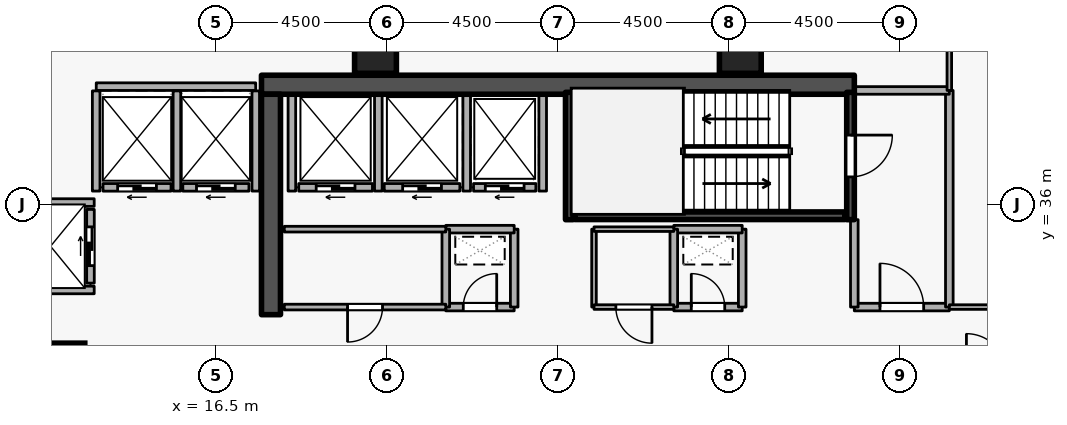
"""IFC4 building model, lengths in metres.
Left out: names, types, materials, properties, quantities, classifications, styles, units other than length and angle.
Written with IfcOpenShell. Run it as: python <this file> out.ifc"""

import sys

from ifc_helpers import new_model, si_unit, direction, frame, frame_2d, origin, origin_2d, place, context, subcontext, project, spatial, rectangle, extrude, element, fill, save


model = new_model("IFC4")
c1 = context("Model", 3, precision=1e-05, world=origin(), true_north=direction((0.0, 1.0)))
c2 = subcontext(c1, "Body", "Model", "MODEL_VIEW")
j1 = project(units=[si_unit("LENGTHUNIT", "METRE"), si_unit("PLANEANGLEUNIT", "RADIAN")], contexts=[c1])
p1 = place(None, origin())
s1 = spatial("IfcSite", under=j1, at=p1, CompositionType="ELEMENT")
p2 = place(p1, origin())
s2 = spatial("IfcBuilding", under=s1, at=p2, CompositionType="ELEMENT")
p3 = place(p2, frame((0.0, 0.0, 192.9)))
s3 = spatial("IfcBuildingStorey", under=s2, at=p3, CompositionType="ELEMENT", Elevation=192.9)
p4 = place(p3, frame((17.7, 39.15, 0.0), z_axis=(0.0, 0.0, 1.0), x_axis=(1.0, 0.0, 0.0)))
e1 = element("IfcWall", 1, at=p4, inside=s3, PredefinedType="SHEAR", context=c2, shape_type="SweptSolid", body=[
    extrude(rectangle(XDim=15.6, YDim=0.5, at=frame_2d((7.8, 0.0))), origin(), (0.0, 0.0, 1.0), 3.6),
])
p5 = place(p3, frame((17.95, 33.1, 0.0), z_axis=(0.0, 0.0, 1.0), x_axis=(0.0, 1.0, 0.0)))
e2 = element("IfcWall", 2, at=p5, inside=s3, PredefinedType="SHEAR", context=c2, shape_type="SweptSolid", body=[
    extrude(rectangle(XDim=5.8, YDim=0.5, at=frame_2d((2.9, 0.0))), origin(), (0.0, 0.0, 1.0), 3.6),
])
for number, where, z_axis, x_axis in (
    (3, (12.5, 31.8, 0.0), (0.0, 0.0, 1.0), (1.0, 0.0, 0.0)),
    (4, (20.7, 40.0, 0.0), (0.0, 0.0, 1.0), (1.0, 0.0, 0.0)),
    (5, (30.3, 40.0, 0.0), (0.0, 0.0, 1.0), (1.0, 0.0, 0.0)),
):
    element("IfcColumn", number, at=place(p3, frame(where, z_axis=z_axis, x_axis=x_axis)), inside=s3, PredefinedType="COLUMN", context=c2, shape_type="SweptSolid", body=[
        extrude(rectangle(XDim=1.1, YDim=1.1, at=origin_2d()), origin(), (0.0, 0.0, 1.0), 3.6),
    ])
p6 = place(p3, frame((24.92, 36.45, 0.0), z_axis=(0.0, 0.0, 1.0), x_axis=(-1.0, 0.0, 0.0)))
e6 = element("IfcWall", 6, at=p6, inside=s3, PredefinedType="STANDARD", context=c2, shape_type="SweptSolid", body=[
    extrude(rectangle(XDim=1.64, YDim=0.2, at=frame_2d((0.82, 0.0))), origin(), (0.0, 0.0, 1.0), 3.34),
])
p7 = place(p6, frame((0.31, 0.0, 0.0)))
e7 = element("IfcOpeningElement", 7, at=p7, cuts=e6, PredefinedType="OPENING", context=c2, shape_type="SweptSolid", body=[
    extrude(rectangle(XDim=1.02, YDim=2.06, at=frame_2d((0.51, 1.03))), frame((0.0, 0.11, 0.0), z_axis=(0.0, -1.0, 0.0), x_axis=(1.0, 0.0, 0.0)), (0.0, 0.0, 1.0), 0.22),
])
p8 = place(p3, frame((22.92, 36.45, 0.0), z_axis=(0.0, 0.0, 1.0), x_axis=(-1.0, 0.0, 0.0)))
e8 = element("IfcWall", 8, at=p8, inside=s3, PredefinedType="STANDARD", context=c2, shape_type="SweptSolid", body=[
    extrude(rectangle(XDim=1.99, YDim=0.2, at=frame_2d((0.995, 0.0))), origin(), (0.0, 0.0, 1.0), 3.34),
])
p9 = place(p8, frame((0.485, 0.0, 0.0)))
e9 = element("IfcOpeningElement", 9, at=p9, cuts=e8, PredefinedType="OPENING", context=c2, shape_type="SweptSolid", body=[
    extrude(rectangle(XDim=1.02, YDim=2.06, at=frame_2d((0.51, 1.03))), frame((0.0, 0.11, 0.0), z_axis=(0.0, -1.0, 0.0), x_axis=(1.0, 0.0, 0.0)), (0.0, 0.0, 1.0), 0.22),
])
p10 = place(p3, frame((20.62, 36.45, 0.0), z_axis=(0.0, 0.0, 1.0), x_axis=(-1.0, 0.0, 0.0)))
e10 = element("IfcWall", 10, at=p10, inside=s3, PredefinedType="STANDARD", context=c2, shape_type="SweptSolid", body=[
    extrude(rectangle(XDim=1.94, YDim=0.2, at=frame_2d((0.97, 0.0))), origin(), (0.0, 0.0, 1.0), 3.34),
])
p11 = place(p10, frame((0.46, 0.0, 0.0)))
e11 = element("IfcOpeningElement", 11, at=p11, cuts=e10, PredefinedType="OPENING", context=c2, shape_type="SweptSolid", body=[
    extrude(rectangle(XDim=1.02, YDim=2.06, at=frame_2d((0.51, 1.03))), frame((0.0, 0.11, 0.0), z_axis=(0.0, -1.0, 0.0), x_axis=(1.0, 0.0, 0.0)), (0.0, 0.0, 1.0), 0.22),
])
p12 = place(p3, frame((17.37, 36.45, 0.0), z_axis=(0.0, 0.0, 1.0), x_axis=(-1.0, 0.0, 0.0)))
e12 = element("IfcWall", 12, at=p12, inside=s3, PredefinedType="STANDARD", context=c2, shape_type="SweptSolid", body=[
    extrude(rectangle(XDim=1.74, YDim=0.2, at=frame_2d((0.87, 0.0))), origin(), (0.0, 0.0, 1.0), 3.34),
])
p13 = place(p12, frame((0.36, 0.0, 0.0)))
e13 = element("IfcOpeningElement", 13, at=p13, cuts=e12, PredefinedType="OPENING", context=c2, shape_type="SweptSolid", body=[
    extrude(rectangle(XDim=1.02, YDim=2.06, at=frame_2d((0.51, 1.03))), frame((0.0, 0.11, 0.0), z_axis=(0.0, -1.0, 0.0), x_axis=(1.0, 0.0, 0.0)), (0.0, 0.0, 1.0), 0.22),
])
p14 = place(p3, frame((15.32, 36.45, 0.0), z_axis=(0.0, 0.0, 1.0), x_axis=(-1.0, 0.0, 0.0)))
e14 = element("IfcWall", 14, at=p14, inside=s3, PredefinedType="STANDARD", context=c2, shape_type="SweptSolid", body=[
    extrude(rectangle(XDim=1.79, YDim=0.2, at=frame_2d((0.895, 0.0))), origin(), (0.0, 0.0, 1.0), 3.34),
])
p15 = place(p14, frame((0.385, 0.0, 0.0)))
e15 = element("IfcOpeningElement", 15, at=p15, cuts=e14, PredefinedType="OPENING", context=c2, shape_type="SweptSolid", body=[
    extrude(rectangle(XDim=1.02, YDim=2.06, at=frame_2d((0.51, 1.03))), frame((0.0, 0.11, 0.0), z_axis=(0.0, -1.0, 0.0), x_axis=(1.0, 0.0, 0.0)), (0.0, 0.0, 1.0), 0.22),
])
p16 = place(p3, frame((13.2, 33.93, 0.0), z_axis=(0.0, 0.0, 1.0), x_axis=(0.0, 1.0, 0.0)))
e16 = element("IfcWall", 16, at=p16, inside=s3, PredefinedType="STANDARD", context=c2, shape_type="SweptSolid", body=[
    extrude(rectangle(XDim=1.94, YDim=0.2, at=frame_2d((0.97, 0.0))), origin(), (0.0, 0.0, 1.0), 3.34),
])
p17 = place(p16, frame((0.46, 0.0, 0.0)))
e17 = element("IfcOpeningElement", 17, at=p17, cuts=e16, PredefinedType="OPENING", context=c2, shape_type="SweptSolid", body=[
    extrude(rectangle(XDim=1.02, YDim=2.06, at=frame_2d((0.51, 1.03))), frame((0.0, 0.11, 0.0), z_axis=(0.0, -1.0, 0.0), x_axis=(1.0, 0.0, 0.0)), (0.0, 0.0, 1.0), 0.22),
])
for number, where, z_axis, x_axis in (
    (18, (25.1, 36.352, 0.0), (0.0, 0.0, 1.0), (0.0, 1.0, 0.0)),
    (19, (23.1, 36.352, 0.0), (0.0, 0.0, 1.0), (0.0, 1.0, 0.0)),
    (20, (20.775, 36.352, 0.0), (0.0, 0.0, 1.0), (0.0, 1.0, 0.0)),
    (21, (18.5, 36.352, 0.0), (0.0, 0.0, 1.0), (0.0, 1.0, 0.0)),
):
    element("IfcWall", number, at=place(p3, frame(where, z_axis=z_axis, x_axis=x_axis)), inside=s3, PredefinedType="STANDARD", context=c2, shape_type="SweptSolid", body=[
        extrude(rectangle(XDim=2.536, YDim=0.2, at=frame_2d((1.268, 0.0))), origin(), (0.0, 0.0, 1.0), 3.34),
    ])
p18 = place(p3, frame((13.352, 39.1, 0.0), z_axis=(0.0, 0.0, 1.0), x_axis=(1.0, 0.0, 0.0)))
e22 = element("IfcWall", 22, at=p18, inside=s3, PredefinedType="STANDARD", context=c2, shape_type="SweptSolid", body=[
    extrude(rectangle(XDim=4.196, YDim=0.2, at=frame_2d((2.098, 0.0))), origin(), (0.0, 0.0, 1.0), 3.34),
])
p19 = place(p3, frame((17.55, 36.352, 0.0), z_axis=(0.0, 0.0, 1.0), x_axis=(0.0, 1.0, 0.0)))
e23 = element("IfcWall", 23, at=p19, inside=s3, PredefinedType="STANDARD", context=c2, shape_type="SweptSolid", body=[
    extrude(rectangle(XDim=2.636, YDim=0.2, at=frame_2d((1.318, 0.0))), origin(), (0.0, 0.0, 1.0), 2.545),
])
for number, where, z_axis, x_axis in (
    (24, (15.475, 36.352, 0.0), (0.0, 0.0, 1.0), (0.0, 1.0, 0.0)),
    (25, (13.35, 36.352, 0.0), (0.0, 0.0, 1.0), (0.0, 1.0, 0.0)),
):
    element("IfcWall", number, at=place(p3, frame(where, z_axis=z_axis, x_axis=x_axis)), inside=s3, PredefinedType="STANDARD", context=c2, shape_type="SweptSolid", body=[
        extrude(rectangle(XDim=2.636, YDim=0.2, at=frame_2d((1.318, 0.0))), origin(), (0.0, 0.0, 1.0), 3.34),
    ])
for number, where, z_axis, x_axis in (
    (26, (11.002, 36.05, 0.0), (0.0, 0.0, 1.0), (1.0, 0.0, 0.0)),
    (27, (11.002, 33.75, 0.0), (0.0, 0.0, 1.0), (1.0, 0.0, 0.0)),
):
    element("IfcWall", number, at=place(p3, frame(where, z_axis=z_axis, x_axis=x_axis)), inside=s3, PredefinedType="STANDARD", context=c2, shape_type="SweptSolid", body=[
        extrude(rectangle(XDim=2.296, YDim=0.2, at=frame_2d((1.148, 0.0))), origin(), (0.0, 0.0, 1.0), 3.34),
    ])
p20 = place(p3, frame((33.2, 38.95, 0.0), z_axis=(0.0, 0.0, 1.0), x_axis=(0.0, -1.0, 0.0)))
e28 = element("IfcWall", 28, at=p20, inside=s3, PredefinedType="SHEAR", context=c2, shape_type="SweptSolid", body=[
    extrude(rectangle(XDim=3.35, YDim=0.2, at=frame_2d((1.675, 0.0))), origin(), (0.0, 0.0, 1.0), 3.6),
])
p21 = place(p20, frame((1.125, 0.0, 0.0)))
e29 = element("IfcOpeningElement", 29, at=p21, cuts=e28, PredefinedType="OPENING", context=c2, shape_type="SweptSolid", body=[
    extrude(rectangle(XDim=1.1, YDim=2.1, at=frame_2d((0.55, 1.05))), frame((0.0, 0.11, 0.0), z_axis=(0.0, -1.0, 0.0), x_axis=(1.0, 0.0, 0.0)), (0.0, 0.0, 1.0), 0.22),
])
p22 = place(p3, frame((25.8, 35.6, 0.0), z_axis=(0.0, 0.0, 1.0), x_axis=(0.0, 1.0, 0.0)))
e30 = element("IfcWall", 30, at=p22, inside=s3, PredefinedType="SHEAR", context=c2, shape_type="SweptSolid", body=[
    extrude(rectangle(XDim=3.35, YDim=0.2, at=frame_2d((1.675, 0.0))), origin(), (0.0, 0.0, 1.0), 3.6),
])
p23 = place(p3, frame((25.95, 35.703, 0.0), z_axis=(0.0, 0.0, 1.0), x_axis=(1.0, 0.0, 0.0)))
e31 = element("IfcWall", 31, at=p23, inside=s3, PredefinedType="SHEAR", context=c2, shape_type="SweptSolid", body=[
    extrude(rectangle(XDim=7.1, YDim=0.2, at=frame_2d((3.55, 0.0))), origin(), (0.0, 0.0, 1.0), 3.6),
])
p24 = place(p3, frame((33.3, 33.3, 0.0), z_axis=(0.0, 0.0, 1.0), x_axis=(1.0, 0.0, 0.0)))
e32 = element("IfcWall", 32, at=p24, inside=s3, PredefinedType="STANDARD", context=c2, shape_type="SweptSolid", body=[
    extrude(rectangle(XDim=2.5, YDim=0.2, at=frame_2d((1.25, 0.0))), origin(), (0.0, 0.0, 1.0), 3.34),
])
p25 = place(p24, frame((0.675, 0.0, 0.0)))
e33 = element("IfcOpeningElement", 33, at=p25, cuts=e32, PredefinedType="OPENING", context=c2, shape_type="SweptSolid", body=[
    extrude(rectangle(XDim=1.15, YDim=2.1, at=frame_2d((0.575, 1.05))), frame((0.0, 0.11, 0.0), z_axis=(0.0, -1.0, 0.0), x_axis=(1.0, 0.0, 0.0)), (0.0, 0.0, 1.0), 0.22),
])
p26 = place(p3, frame((35.8, 33.3, 0.0), z_axis=(0.0, 0.0, 1.0), x_axis=(0.0, 1.0, 0.0)))
e34 = element("IfcWall", 34, at=p26, inside=s3, PredefinedType="STANDARD", context=c2, shape_type="SweptSolid", body=[
    extrude(rectangle(XDim=5.7, YDim=0.2, at=frame_2d((2.85, 0.0))), origin(), (0.0, 0.0, 1.0), 3.34),
])
p27 = place(p3, frame((35.8, 39.0, 0.0), z_axis=(0.0, 0.0, 1.0), x_axis=(-1.0, 0.0, 0.0)))
e35 = element("IfcWall", 35, at=p27, inside=s3, PredefinedType="STANDARD", context=c2, shape_type="SweptSolid", body=[
    extrude(rectangle(XDim=2.5, YDim=0.2, at=frame_2d((1.25, 0.0))), origin(), (0.0, 0.0, 1.0), 3.34),
])
p28 = place(p3, frame((33.3, 35.6, 0.0), z_axis=(0.0, 0.0, 1.0), x_axis=(0.0, -1.0, 0.0)))
e36 = element("IfcWall", 36, at=p28, inside=s3, PredefinedType="STANDARD", context=c2, shape_type="SweptSolid", body=[
    extrude(rectangle(XDim=2.3, YDim=0.2, at=frame_2d((1.15, 0.0))), origin(), (0.0, 0.0, 1.0), 2.545),
])
p29 = place(p3, frame((22.55, 33.3, 0.0), z_axis=(0.0, 0.0, 1.0), x_axis=(1.0, 0.0, 0.0)))
e37 = element("IfcWall", 37, at=p29, inside=s3, PredefinedType="STANDARD", context=c2, shape_type="SweptSolid", body=[
    extrude(rectangle(XDim=1.8, YDim=0.2, at=frame_2d((0.9, 0.0))), origin(), (0.0, 0.0, 1.0), 3.34),
])
p30 = place(p29, frame((0.46, 0.0, 0.0)))
e38 = element("IfcOpeningElement", 38, at=p30, cuts=e37, PredefinedType="OPENING", context=c2, shape_type="SweptSolid", body=[
    extrude(rectangle(XDim=0.88, YDim=2.04, at=frame_2d((0.44, 1.02))), frame((0.0, 0.11, 0.0), z_axis=(0.0, -1.0, 0.0), x_axis=(1.0, 0.0, 0.0)), (0.0, 0.0, 1.0), 0.22),
])
p31 = place(p3, frame((24.35, 33.3, 0.0), z_axis=(0.0, 0.0, 1.0), x_axis=(0.0, 1.0, 0.0)))
e39 = element("IfcWall", 39, at=p31, inside=s3, PredefinedType="STANDARD", context=c2, shape_type="SweptSolid", body=[
    extrude(rectangle(XDim=2.05, YDim=0.2, at=frame_2d((1.025, 0.0))), origin(), (0.0, 0.0, 1.0), 3.34),
])
p32 = place(p3, frame((24.35, 35.35, 0.0), z_axis=(0.0, 0.0, 1.0), x_axis=(-1.0, 0.0, 0.0)))
e40 = element("IfcWall", 40, at=p32, inside=s3, PredefinedType="STANDARD", context=c2, shape_type="SweptSolid", body=[
    extrude(rectangle(XDim=1.8, YDim=0.2, at=frame_2d((0.9, 0.0))), origin(), (0.0, 0.0, 1.0), 3.34),
])
p33 = place(p3, frame((22.55, 35.35, 0.0), z_axis=(0.0, 0.0, 1.0), x_axis=(0.0, -1.0, 0.0)))
e41 = element("IfcWall", 41, at=p33, inside=s3, PredefinedType="STANDARD", context=c2, shape_type="SweptSolid", body=[
    extrude(rectangle(XDim=2.05, YDim=0.2, at=frame_2d((1.025, 0.0))), origin(), (0.0, 0.0, 1.0), 3.34),
])
p34 = place(p3, frame((28.55, 33.3, 0.0), z_axis=(0.0, 0.0, 1.0), x_axis=(1.0, 0.0, 0.0)))
e42 = element("IfcWall", 42, at=p34, inside=s3, PredefinedType="STANDARD", context=c2, shape_type="SweptSolid", body=[
    extrude(rectangle(XDim=1.8, YDim=0.2, at=frame_2d((0.9, 0.0))), origin(), (0.0, 0.0, 1.0), 3.34),
])
p35 = place(p34, frame((0.46, 0.0, 0.0)))
e43 = element("IfcOpeningElement", 43, at=p35, cuts=e42, PredefinedType="OPENING", context=c2, shape_type="SweptSolid", body=[
    extrude(rectangle(XDim=0.88, YDim=2.04, at=frame_2d((0.44, 1.02))), frame((0.0, 0.11, 0.0), z_axis=(0.0, -1.0, 0.0), x_axis=(1.0, 0.0, 0.0)), (0.0, 0.0, 1.0), 0.22),
])
p36 = place(p3, frame((30.35, 33.3, 0.0), z_axis=(0.0, 0.0, 1.0), x_axis=(0.0, 1.0, 0.0)))
e44 = element("IfcWall", 44, at=p36, inside=s3, PredefinedType="STANDARD", context=c2, shape_type="SweptSolid", body=[
    extrude(rectangle(XDim=2.05, YDim=0.2, at=frame_2d((1.025, 0.0))), origin(), (0.0, 0.0, 1.0), 3.34),
])
p37 = place(p3, frame((30.35, 35.35, 0.0), z_axis=(0.0, 0.0, 1.0), x_axis=(-1.0, 0.0, 0.0)))
e45 = element("IfcWall", 45, at=p37, inside=s3, PredefinedType="STANDARD", context=c2, shape_type="SweptSolid", body=[
    extrude(rectangle(XDim=1.8, YDim=0.2, at=frame_2d((0.9, 0.0))), origin(), (0.0, 0.0, 1.0), 3.34),
])
p38 = place(p3, frame((28.55, 35.35, 0.0), z_axis=(0.0, 0.0, 1.0), x_axis=(0.0, -1.0, 0.0)))
e46 = element("IfcWall", 46, at=p38, inside=s3, PredefinedType="STANDARD", context=c2, shape_type="SweptSolid", body=[
    extrude(rectangle(XDim=2.05, YDim=0.2, at=frame_2d((1.025, 0.0))), origin(), (0.0, 0.0, 1.0), 3.34),
])
p39 = place(p3, frame((18.3, 35.35, 0.0), z_axis=(0.0, 0.0, 1.0), x_axis=(1.0, 0.0, 0.0)))
e47 = element("IfcWall", 47, at=p39, inside=s3, PredefinedType="PARTITIONING", context=c2, shape_type="SweptSolid", body=[
    extrude(rectangle(XDim=4.25, YDim=0.15, at=frame_2d((2.125, 0.0))), origin(), (0.0, 0.0, 1.0), 3.34),
])
p40 = place(p3, frame((22.55, 33.3, 0.0), z_axis=(0.0, 0.0, 1.0), x_axis=(-1.0, 0.0, 0.0)))
e48 = element("IfcWall", 48, at=p40, inside=s3, PredefinedType="PARTITIONING", context=c2, shape_type="SweptSolid", body=[
    extrude(rectangle(XDim=4.25, YDim=0.15, at=frame_2d((2.125, 0.0))), origin(), (0.0, 0.0, 1.0), 3.34),
])
p41 = place(p40, frame((1.665, 0.0, 0.0)))
e49 = element("IfcOpeningElement", 49, at=p41, cuts=e48, PredefinedType="OPENING", context=c2, shape_type="SweptSolid", body=[
    extrude(rectangle(XDim=0.92, YDim=2.08, at=frame_2d((0.46, 1.04))), frame((0.0, 0.085, 0.0), z_axis=(0.0, -1.0, 0.0), x_axis=(1.0, 0.0, 0.0)), (0.0, 0.0, 1.0), 0.17),
])
p42 = place(p3, frame((26.45, 33.3, 0.0), z_axis=(0.0, 0.0, 1.0), x_axis=(0.0, 1.0, 0.0)))
e50 = element("IfcWall", 50, at=p42, inside=s3, PredefinedType="PARTITIONING", context=c2, shape_type="SweptSolid", body=[
    extrude(rectangle(XDim=2.05, YDim=0.12, at=frame_2d((1.025, 0.0))), origin(), (0.0, 0.0, 1.0), 3.34),
])
p43 = place(p3, frame((26.45, 35.35, 0.0), z_axis=(0.0, 0.0, 1.0), x_axis=(1.0, 0.0, 0.0)))
e51 = element("IfcWall", 51, at=p43, inside=s3, PredefinedType="PARTITIONING", context=c2, shape_type="SweptSolid", body=[
    extrude(rectangle(XDim=2.1, YDim=0.12, at=frame_2d((1.05, 0.0))), origin(), (0.0, 0.0, 1.0), 3.34),
])
p44 = place(p3, frame((28.55, 33.3, 0.0), z_axis=(0.0, 0.0, 1.0), x_axis=(-1.0, 0.0, 0.0)))
e52 = element("IfcWall", 52, at=p44, inside=s3, PredefinedType="PARTITIONING", context=c2, shape_type="SweptSolid", body=[
    extrude(rectangle(XDim=2.1, YDim=0.12, at=frame_2d((1.05, 0.0))), origin(), (0.0, 0.0, 1.0), 3.34),
])
p45 = place(p44, frame((0.575, 0.0, 0.0)))
e53 = element("IfcOpeningElement", 53, at=p45, cuts=e52, PredefinedType="OPENING", context=c2, shape_type="SweptSolid", body=[
    extrude(rectangle(XDim=0.95, YDim=2.1, at=frame_2d((0.475, 1.05))), frame((0.0, 0.07, 0.0), z_axis=(0.0, -1.0, 0.0), x_axis=(1.0, 0.0, 0.0)), (0.0, 0.0, 1.0), 0.14),
])
p46 = place(p3, frame((37.75, 33.3, 0.0), z_axis=(0.0, 0.0, 1.0), x_axis=(-1.0, 0.0, 0.0)))
e54 = element("IfcWall", 54, at=p46, inside=s3, PredefinedType="PARTITIONING", context=c2, shape_type="SweptSolid", body=[
    extrude(rectangle(XDim=1.95, YDim=0.12, at=frame_2d((0.975, 0.0))), origin(), (0.0, 0.0, 1.0), 3.34),
])
p47 = place(p3, frame((35.8, 39.0, 0.0), z_axis=(0.0, 0.0, 1.0), x_axis=(0.0, 1.0, 0.0)))
e55 = element("IfcWall", 55, at=p47, inside=s3, PredefinedType="PARTITIONING", context=c2, shape_type="SweptSolid", body=[
    extrude(rectangle(XDim=11.72, YDim=0.12, at=frame_2d((5.86, 0.0))), origin(), (0.0, 0.0, 1.0), 3.34),
])
p48 = place(p7, origin())
e56 = element("IfcDoor", 56, at=p48, inside=s3, OperationType="SLIDING_TO_LEFT", PredefinedType="DOOR", context=c2, shape_type="SweptSolid", body=[
    extrude(rectangle(XDim=1.02, YDim=2.06, at=frame_2d((0.51, 1.03))), frame((0.0, 0.025, 0.0), z_axis=(0.0, -1.0, 0.0), x_axis=(1.0, 0.0, 0.0)), (0.0, 0.0, 1.0), 0.05),
])
fill(e7, e56)
p49 = place(p9, origin())
e57 = element("IfcDoor", 57, at=p49, inside=s3, OperationType="SLIDING_TO_LEFT", PredefinedType="DOOR", context=c2, shape_type="SweptSolid", body=[
    extrude(rectangle(XDim=1.02, YDim=2.06, at=frame_2d((0.51, 1.03))), frame((0.0, 0.025, 0.0), z_axis=(0.0, -1.0, 0.0), x_axis=(1.0, 0.0, 0.0)), (0.0, 0.0, 1.0), 0.05),
])
fill(e9, e57)
p50 = place(p11, origin())
e58 = element("IfcDoor", 58, at=p50, inside=s3, OperationType="SLIDING_TO_LEFT", PredefinedType="DOOR", context=c2, shape_type="SweptSolid", body=[
    extrude(rectangle(XDim=1.02, YDim=2.06, at=frame_2d((0.51, 1.03))), frame((0.0, 0.025, 0.0), z_axis=(0.0, -1.0, 0.0), x_axis=(1.0, 0.0, 0.0)), (0.0, 0.0, 1.0), 0.05),
])
fill(e11, e58)
p51 = place(p13, origin())
e59 = element("IfcDoor", 59, at=p51, inside=s3, OperationType="SLIDING_TO_LEFT", PredefinedType="DOOR", context=c2, shape_type="SweptSolid", body=[
    extrude(rectangle(XDim=1.02, YDim=2.06, at=frame_2d((0.51, 1.03))), frame((0.0, 0.025, 0.0), z_axis=(0.0, -1.0, 0.0), x_axis=(1.0, 0.0, 0.0)), (0.0, 0.0, 1.0), 0.05),
])
fill(e13, e59)
p52 = place(p15, origin())
e60 = element("IfcDoor", 60, at=p52, inside=s3, OperationType="SLIDING_TO_LEFT", PredefinedType="DOOR", context=c2, shape_type="SweptSolid", body=[
    extrude(rectangle(XDim=1.02, YDim=2.06, at=frame_2d((0.51, 1.03))), frame((0.0, 0.025, 0.0), z_axis=(0.0, -1.0, 0.0), x_axis=(1.0, 0.0, 0.0)), (0.0, 0.0, 1.0), 0.05),
])
fill(e15, e60)
p53 = place(p17, origin())
e61 = element("IfcDoor", 61, at=p53, inside=s3, OperationType="SLIDING_TO_LEFT", PredefinedType="DOOR", context=c2, shape_type="SweptSolid", body=[
    extrude(rectangle(XDim=1.02, YDim=2.06, at=frame_2d((0.51, 1.03))), frame((0.0, 0.025, 0.0), z_axis=(0.0, -1.0, 0.0), x_axis=(1.0, 0.0, 0.0)), (0.0, 0.0, 1.0), 0.05),
])
fill(e17, e61)
p54 = place(p21, origin())
e62 = element("IfcDoor", 62, at=p54, inside=s3, OperationType="SINGLE_SWING_LEFT", PredefinedType="DOOR", context=c2, shape_type="SweptSolid", body=[
    extrude(rectangle(XDim=1.1, YDim=2.1, at=frame_2d((0.55, 1.05))), frame((0.0, 0.025, 0.0), z_axis=(0.0, -1.0, 0.0), x_axis=(1.0, 0.0, 0.0)), (0.0, 0.0, 1.0), 0.05),
])
fill(e29, e62)
p55 = place(p25, origin())
e63 = element("IfcDoor", 63, at=p55, inside=s3, OperationType="SINGLE_SWING_LEFT", PredefinedType="DOOR", context=c2, shape_type="SweptSolid", body=[
    extrude(rectangle(XDim=1.15, YDim=2.1, at=frame_2d((0.575, 1.05))), frame((0.0, 0.025, 0.0), z_axis=(0.0, -1.0, 0.0), x_axis=(1.0, 0.0, 0.0)), (0.0, 0.0, 1.0), 0.05),
])
fill(e33, e63)
p56 = place(p30, origin())
e64 = element("IfcDoor", 64, at=p56, inside=s3, OperationType="SINGLE_SWING_RIGHT", PredefinedType="DOOR", context=c2, shape_type="SweptSolid", body=[
    extrude(rectangle(XDim=0.88, YDim=2.04, at=frame_2d((0.44, 1.02))), frame((0.0, 0.025, 0.0), z_axis=(0.0, -1.0, 0.0), x_axis=(1.0, 0.0, 0.0)), (0.0, 0.0, 1.0), 0.05),
])
fill(e38, e64)
p57 = place(p35, origin())
e65 = element("IfcDoor", 65, at=p57, inside=s3, OperationType="SINGLE_SWING_LEFT", PredefinedType="DOOR", context=c2, shape_type="SweptSolid", body=[
    extrude(rectangle(XDim=0.88, YDim=2.04, at=frame_2d((0.44, 1.02))), frame((0.0, 0.025, 0.0), z_axis=(0.0, -1.0, 0.0), x_axis=(1.0, 0.0, 0.0)), (0.0, 0.0, 1.0), 0.05),
])
fill(e43, e65)
p58 = place(p41, origin())
e66 = element("IfcDoor", 66, at=p58, inside=s3, OperationType="SINGLE_SWING_RIGHT", PredefinedType="DOOR", context=c2, shape_type="SweptSolid", body=[
    extrude(rectangle(XDim=0.92, YDim=2.08, at=frame_2d((0.46, 1.04))), frame((0.0, 0.025, 0.0), z_axis=(0.0, -1.0, 0.0), x_axis=(1.0, 0.0, 0.0)), (0.0, 0.0, 1.0), 0.05),
])
fill(e49, e66)
p59 = place(p45, origin())
e67 = element("IfcDoor", 67, at=p59, inside=s3, OperationType="SINGLE_SWING_LEFT", PredefinedType="DOOR", context=c2, shape_type="SweptSolid", body=[
    extrude(rectangle(XDim=0.95, YDim=2.1, at=frame_2d((0.475, 1.05))), frame((0.0, 0.025, 0.0), z_axis=(0.0, -1.0, 0.0), x_axis=(1.0, 0.0, 0.0)), (0.0, 0.0, 1.0), 0.05),
])
fill(e53, e67)
save(model, sys.argv[1])
